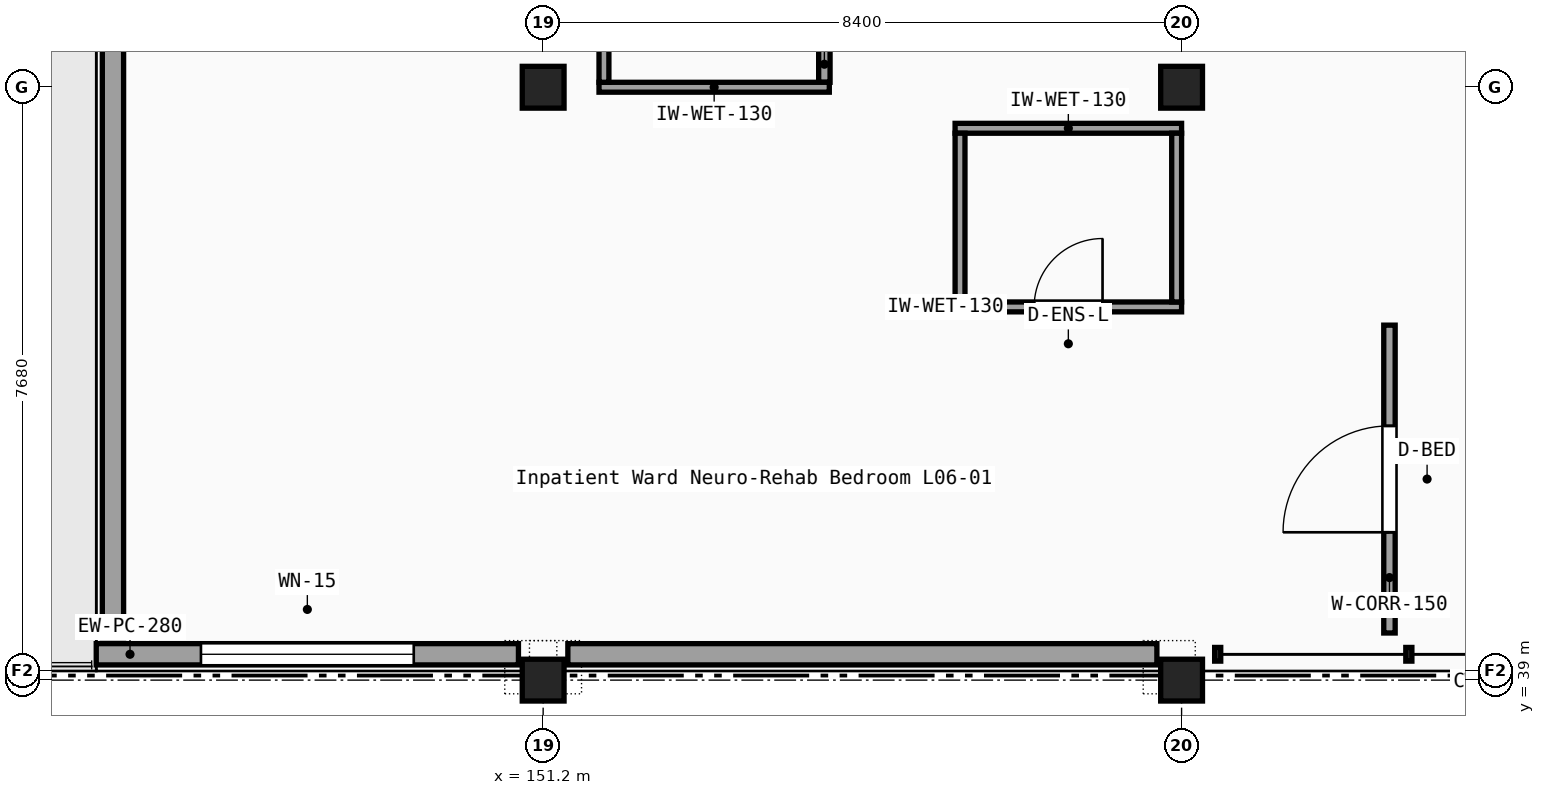
"""IFC4 building model, lengths in metres.
Left out: names, types, materials, properties, quantities, classifications, styles, units other than length and angle.
Written with IfcOpenShell. Run it as: python <this file> out.ifc"""

import sys

from ifc_helpers import new_model, si_unit, direction, frame, frame_2d, origin, origin_2d, place, context, subcontext, project, spatial, rectangle, extrude, element, fill, save


model = new_model("IFC4")
c1 = context("Model", 3, precision=1e-05, world=origin(), true_north=direction((0.0, 1.0)))
c2 = subcontext(c1, "Body", "Model", "MODEL_VIEW")
j1 = project(units=[si_unit("LENGTHUNIT", "METRE"), si_unit("PLANEANGLEUNIT", "RADIAN")], contexts=[c1])
p1 = place(None, origin())
s1 = spatial("IfcSite", under=j1, at=p1, CompositionType="ELEMENT")
p2 = place(p1, origin())
s2 = spatial("IfcBuilding", under=s1, at=p2, CompositionType="ELEMENT")
p3 = place(p2, frame((0.0, 0.0, 27.0)))
s3 = spatial("IfcBuildingStorey", under=s2, at=p3, CompositionType="ELEMENT", Elevation=27.0)
for number, where, z_axis, x_axis in (
    (1, (151.2, 39.0, 0.0), (0.0, 0.0, 1.0), (1.0, 0.0, 0.0)),
    (2, (151.2, 46.8, 0.0), (0.0, 0.0, 1.0), (1.0, 0.0, 0.0)),
    (3, (159.6, 39.0, 0.0), (0.0, 0.0, 1.0), (1.0, 0.0, 0.0)),
    (4, (159.6, 46.8, 0.0), (0.0, 0.0, 1.0), (1.0, 0.0, 0.0)),
):
    element("IfcColumn", number, at=place(p3, frame(where, z_axis=z_axis, x_axis=x_axis)), inside=s3, PredefinedType="COLUMN", context=c2, shape_type="SweptSolid", body=[
        extrude(rectangle(XDim=0.55, YDim=0.55, at=origin_2d()), origin(), (0.0, 0.0, 1.0), 4.05),
    ])
p4 = place(p3, frame((145.54, 39.56, 0.0), z_axis=(0.0, 0.0, 1.0), x_axis=(0.0, 1.0, 0.0)))
e5 = element("IfcWall", 5, at=p4, inside=s3, PredefinedType="SOLIDWALL", context=c2, shape_type="SweptSolid", body=[
    extrude(rectangle(XDim=75.2, YDim=0.28, at=frame_2d((37.6, 0.0))), origin(), (0.0, 0.0, 1.0), 3.77),
])
p5 = place(p4, frame((22.15, 0.0, 0.0)))
e6 = element("IfcOpeningElement", 6, at=p5, cuts=e5, PredefinedType="OPENING", context=c2, shape_type="SweptSolid", body=[
    extrude(rectangle(XDim=1.5, YDim=2.2, at=frame_2d((0.75, 1.1))), frame((0.0, 0.15, 0.0), z_axis=(0.0, -1.0, 0.0), x_axis=(1.0, 0.0, 0.0)), (0.0, 0.0, 1.0), 0.3),
])
p6 = place(p4, frame((61.6, 0.0, 0.0)))
e7 = element("IfcOpeningElement", 7, at=p6, cuts=e5, PredefinedType="OPENING", context=c2, shape_type="SweptSolid", body=[
    extrude(rectangle(XDim=1.2, YDim=2.2, at=frame_2d((0.6, 1.1))), frame((0.0, 0.15, 0.0), z_axis=(0.0, -1.0, 0.0), x_axis=(1.0, 0.0, 0.0)), (0.0, 0.0, 1.0), 0.3),
])
p7 = place(p3, frame((145.32, 39.34, 0.0), z_axis=(0.0, 0.0, 1.0), x_axis=(1.0, 0.0, 0.0)))
e8 = element("IfcWall", 8, at=p7, inside=s3, PredefinedType="SOLIDWALL", context=c2, shape_type="SweptSolid", body=[
    extrude(rectangle(XDim=5.555, YDim=0.28, at=frame_2d((2.777, 0.0))), origin(), (0.0, 0.0, 1.0), 3.53),
])
p8 = place(p7, frame((1.377, 0.0, 0.75)))
e9 = element("IfcOpeningElement", 9, at=p8, cuts=e8, PredefinedType="OPENING", context=c2, shape_type="SweptSolid", body=[
    extrude(rectangle(XDim=2.8, YDim=1.75, at=frame_2d((1.4, 0.875))), frame((0.0, 0.15, 0.0), z_axis=(0.0, -1.0, 0.0), x_axis=(1.0, 0.0, 0.0)), (0.0, 0.0, 1.0), 0.3),
])
p9 = place(p3, frame((151.525, 39.34, 0.0), z_axis=(0.0, 0.0, 1.0), x_axis=(1.0, 0.0, 0.0)))
e10 = element("IfcWall", 10, at=p9, inside=s3, PredefinedType="SOLIDWALL", context=c2, shape_type="SweptSolid", body=[
    extrude(rectangle(XDim=7.75, YDim=0.28, at=frame_2d((3.875, 0.0))), origin(), (0.0, 0.0, 1.0), 3.53),
])
p10 = place(p3, frame((154.9, 46.865, 0.0), z_axis=(0.0, 0.0, 1.0), x_axis=(0.0, 1.0, 0.0)))
e11 = element("IfcWall", 11, at=p10, inside=s3, PredefinedType="PARTITIONING", context=c2, shape_type="SweptSolid", body=[
    extrude(rectangle(XDim=2.97, YDim=0.15, at=frame_2d((1.485, 0.0))), origin(), (0.0, 0.0, 1.0), 3.26),
])
p11 = place(p10, frame((0.985, 0.0, 0.0)))
e12 = element("IfcOpeningElement", 12, at=p11, cuts=e11, PredefinedType="OPENING", context=c2, shape_type="SweptSolid", body=[
    extrude(rectangle(XDim=1.0, YDim=2.15, at=frame_2d((0.5, 1.075))), frame((0.0, 0.085, 0.0), z_axis=(0.0, -1.0, 0.0), x_axis=(1.0, 0.0, 0.0)), (0.0, 0.0, 1.0), 0.17),
])
p12 = place(p3, frame((151.935, 46.8, 0.0), z_axis=(0.0, 0.0, 1.0), x_axis=(1.0, 0.0, 0.0)))
e13 = element("IfcWall", 13, at=p12, inside=s3, PredefinedType="PARTITIONING", context=c2, shape_type="SweptSolid", body=[
    extrude(rectangle(XDim=3.03, YDim=0.13, at=frame_2d((1.515, 0.0))), origin(), (0.0, 0.0, 1.0), 3.26),
])
p13 = place(p3, frame((152.0, 46.865, 0.0), z_axis=(0.0, 0.0, 1.0), x_axis=(0.0, 1.0, 0.0)))
e14 = element("IfcWall", 14, at=p13, inside=s3, PredefinedType="PARTITIONING", context=c2, shape_type="SweptSolid", body=[
    extrude(rectangle(XDim=2.97, YDim=0.13, at=frame_2d((1.485, 0.0))), origin(), (0.0, 0.0, 1.0), 3.26),
])
p14 = place(p3, frame((162.335, 39.62, 0.0), z_axis=(0.0, 0.0, 1.0), x_axis=(0.0, 1.0, 0.0)))
e15 = element("IfcWall", 15, at=p14, inside=s3, PredefinedType="PARTITIONING", context=c2, shape_type="SweptSolid", body=[
    extrude(rectangle(XDim=4.05, YDim=0.15, at=frame_2d((2.025, 0.0))), origin(), (0.0, 0.0, 1.0), 3.77),
])
p15 = place(p14, frame((1.325, 0.0, 0.0)))
e16 = element("IfcOpeningElement", 16, at=p15, cuts=e15, PredefinedType="OPENING", context=c2, shape_type="SweptSolid", body=[
    extrude(rectangle(XDim=1.4, YDim=2.2, at=frame_2d((0.7, 1.1))), frame((0.0, 0.085, 0.0), z_axis=(0.0, -1.0, 0.0), x_axis=(1.0, 0.0, 0.0)), (0.0, 0.0, 1.0), 0.17),
])
p16 = place(p3, frame((156.62, 43.91, 0.0), z_axis=(0.0, 0.0, 1.0), x_axis=(1.0, 0.0, 0.0)))
e17 = element("IfcWall", 17, at=p16, inside=s3, PredefinedType="PARTITIONING", context=c2, shape_type="SweptSolid", body=[
    extrude(rectangle(XDim=2.98, YDim=0.13, at=frame_2d((1.49, 0.0))), origin(), (0.0, 0.0, 1.0), 3.54),
])
p17 = place(p16, frame((1.04, 0.0, 0.0)))
e18 = element("IfcOpeningElement", 18, at=p17, cuts=e17, PredefinedType="OPENING", context=c2, shape_type="SweptSolid", body=[
    extrude(rectangle(XDim=0.9, YDim=2.1, at=frame_2d((0.45, 1.05))), frame((0.0, 0.075, 0.0), z_axis=(0.0, -1.0, 0.0), x_axis=(1.0, 0.0, 0.0)), (0.0, 0.0, 1.0), 0.15),
])
p18 = place(p3, frame((156.62, 46.26, 0.0), z_axis=(0.0, 0.0, 1.0), x_axis=(1.0, 0.0, 0.0)))
e19 = element("IfcWall", 19, at=p18, inside=s3, PredefinedType="PARTITIONING", context=c2, shape_type="SweptSolid", body=[
    extrude(rectangle(XDim=2.98, YDim=0.13, at=frame_2d((1.49, 0.0))), origin(), (0.0, 0.0, 1.0), 3.54),
])
p19 = place(p3, frame((156.685, 43.975, 0.0), z_axis=(0.0, 0.0, 1.0), x_axis=(0.0, 1.0, 0.0)))
e20 = element("IfcWall", 20, at=p19, inside=s3, PredefinedType="PARTITIONING", context=c2, shape_type="SweptSolid", body=[
    extrude(rectangle(XDim=2.22, YDim=0.13, at=frame_2d((1.11, 0.0))), origin(), (0.0, 0.0, 1.0), 3.77),
])
p20 = place(p3, frame((159.535, 43.975, 0.0), z_axis=(0.0, 0.0, 1.0), x_axis=(0.0, 1.0, 0.0)))
e21 = element("IfcWall", 21, at=p20, inside=s3, PredefinedType="PARTITIONING", context=c2, shape_type="SweptSolid", body=[
    extrude(rectangle(XDim=2.22, YDim=0.13, at=frame_2d((1.11, 0.0))), origin(), (0.0, 0.0, 1.0), 3.54),
])
p21 = place(p8, origin())
e22 = element("IfcWindow", 22, at=p21, inside=s3, PartitioningType="SINGLE_PANEL", PredefinedType="WINDOW", context=c2, shape_type="SweptSolid", body=[
    extrude(rectangle(XDim=2.8, YDim=1.75, at=frame_2d((1.4, 0.875))), frame((0.0, 0.03, 0.0), z_axis=(0.0, -1.0, 0.0), x_axis=(1.0, 0.0, 0.0)), (0.0, 0.0, 1.0), 0.06),
])
fill(e9, e22)
p22 = place(p15, origin())
e23 = element("IfcDoor", 23, at=p22, inside=s3, OperationType="SINGLE_SWING_LEFT", PredefinedType="DOOR", context=c2, shape_type="SweptSolid", body=[
    extrude(rectangle(XDim=1.4, YDim=2.2, at=frame_2d((0.7, 1.1))), frame((0.0, 0.025, 0.0), z_axis=(0.0, -1.0, 0.0), x_axis=(1.0, 0.0, 0.0)), (0.0, 0.0, 1.0), 0.05),
])
fill(e16, e23)
p23 = place(p17, origin())
e24 = element("IfcDoor", 24, at=p23, inside=s3, OperationType="SINGLE_SWING_RIGHT", PredefinedType="DOOR", context=c2, shape_type="SweptSolid", body=[
    extrude(rectangle(XDim=0.9, YDim=2.1, at=frame_2d((0.45, 1.05))), frame((0.0, 0.025, 0.0), z_axis=(0.0, -1.0, 0.0), x_axis=(1.0, 0.0, 0.0)), (0.0, 0.0, 1.0), 0.05),
])
fill(e18, e24)
save(model, sys.argv[1])
